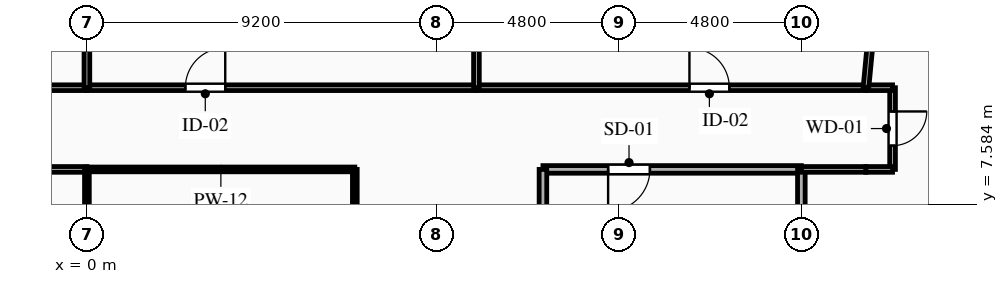
"""IFC4 building model, lengths in metres.
Left out: names, types, materials, properties, quantities, classifications, styles, units other than length and angle.
Written with IfcOpenShell. Run it as: python <this file> out.ifc"""

import sys

from ifc_helpers import new_model, si_unit, direction, frame, frame_2d, origin, place, context, subcontext, project, spatial, rectangle, extrude, element, fill, save


model = new_model("IFC4")
c1 = context("Model", 3, precision=1e-05, world=origin(), true_north=direction((0.0, 1.0)))
c2 = subcontext(c1, "Body", "Model", "MODEL_VIEW")
j1 = project(units=[si_unit("LENGTHUNIT", "METRE"), si_unit("PLANEANGLEUNIT", "RADIAN")], contexts=[c1])
p1 = place(None, origin())
s1 = spatial("IfcSite", under=j1, at=p1, CompositionType="ELEMENT")
p2 = place(p1, origin())
s2 = spatial("IfcBuilding", under=s1, at=p2, CompositionType="ELEMENT")
p3 = place(p2, frame((0.0, 0.0, 235.0)))
s3 = spatial("IfcBuildingStorey", under=s2, at=p3, CompositionType="ELEMENT", Elevation=235.0)
p4 = place(p3, frame((18.8, 8.5, 0.0), z_axis=(0.0, 0.0, 1.0), x_axis=(-1.0, 0.0, 0.0)))
e1 = element("IfcWall", 1, at=p4, inside=s3, PredefinedType="PARTITIONING", context=c2, shape_type="SweptSolid", body=[
    extrude(rectangle(XDim=6.8, YDim=0.2, at=frame_2d((3.4, 0.0))), origin(), (0.0, 0.0, 1.0), 3.04),
])
p5 = place(p4, frame((3.985, 0.0, 0.0)))
e2 = element("IfcOpeningElement", 2, at=p5, cuts=e1, PredefinedType="OPENING", context=c2, shape_type="SweptSolid", body=[
    extrude(rectangle(XDim=1.1, YDim=2.15, at=frame_2d((0.55, 1.075))), frame((0.0, 0.11, 0.0), z_axis=(0.0, -1.0, 0.0), x_axis=(1.0, 0.0, 0.0)), (0.0, 0.0, 1.0), 0.22),
])
p6 = place(p3, frame((12.0, 8.5, 0.0), z_axis=(0.0, 0.0, 1.0), x_axis=(0.0, -1.0, 0.0)))
e3 = element("IfcWall", 3, at=p6, inside=s3, PredefinedType="PARTITIONING", context=c2, shape_type="SweptSolid", body=[
    extrude(rectangle(XDim=2.9, YDim=0.2, at=frame_2d((1.45, 0.0))), origin(), (0.0, 0.0, 1.0), 3.04),
])
p7 = place(p3, frame((18.8, 5.6, 0.0), z_axis=(0.0, 0.0, 1.0), x_axis=(0.0, 1.0, 0.0)))
e4 = element("IfcWall", 4, at=p7, inside=s3, PredefinedType="PARTITIONING", context=c2, shape_type="SweptSolid", body=[
    extrude(rectangle(XDim=2.9, YDim=0.2, at=frame_2d((1.45, 0.0))), origin(), (0.0, 0.0, 1.0), 2.665),
])
p8 = place(p3, frame((-7.9, 10.65, 0.0), z_axis=(0.0, 0.0, 1.0), x_axis=(1.0, 0.0, 0.0)))
e5 = element("IfcWall", 5, at=p8, inside=s3, PredefinedType="PARTITIONING", context=c2, shape_type="SweptSolid", body=[
    extrude(rectangle(XDim=7.9, YDim=0.15, at=frame_2d((3.95, 0.0))), origin(), (0.0, 0.0, 1.0), 3.04),
])
p9 = place(p8, frame((3.475, 0.0, 0.0)))
e6 = element("IfcOpeningElement", 6, at=p9, cuts=e5, PredefinedType="OPENING", context=c2, shape_type="SweptSolid", body=[
    extrude(rectangle(XDim=0.95, YDim=2.1, at=frame_2d((0.475, 1.05))), frame((0.0, 0.085, 0.0), z_axis=(0.0, -1.0, 0.0), x_axis=(1.0, 0.0, 0.0)), (0.0, 0.0, 1.0), 0.17),
])
p10 = place(p3, frame((0.0, 8.5, 0.0), z_axis=(0.0, 0.0, 1.0), x_axis=(-1.0, 0.0, 0.0)))
e7 = element("IfcWall", 7, at=p10, inside=s3, PredefinedType="PARTITIONING", context=c2, shape_type="SweptSolid", body=[
    extrude(rectangle(XDim=7.05, YDim=0.15, at=frame_2d((3.525, 0.0))), origin(), (0.0, 0.0, 1.0), 3.04),
])
p11 = place(p3, frame((21.2, 10.65, 0.0), z_axis=(0.0, 0.0, 1.0), x_axis=(0.0, -1.0, 0.0)))
e8 = element("IfcWall", 8, at=p11, inside=s3, PredefinedType="PARTITIONING", context=c2, shape_type="SweptSolid", body=[
    extrude(rectangle(XDim=2.15, YDim=0.15, at=frame_2d((1.075, 0.0))), origin(), (0.0, 0.0, 1.0), 3.04),
])
p12 = place(p11, frame((0.625, 0.0, 0.0)))
e9 = element("IfcOpeningElement", 9, at=p12, cuts=e8, PredefinedType="OPENING", context=c2, shape_type="SweptSolid", body=[
    extrude(rectangle(XDim=0.9, YDim=2.1, at=frame_2d((0.45, 1.05))), frame((0.0, 0.085, 0.0), z_axis=(0.0, -1.0, 0.0), x_axis=(1.0, 0.0, 0.0)), (0.0, 0.0, 1.0), 0.17),
])
p13 = place(p3, frame((20.5, 8.5, 0.0), z_axis=(0.0, 0.0, 1.0), x_axis=(-1.0, 0.0, 0.0)))
e10 = element("IfcWall", 10, at=p13, inside=s3, PredefinedType="PARTITIONING", context=c2, shape_type="SweptSolid", body=[
    extrude(rectangle(XDim=1.7, YDim=0.15, at=frame_2d((0.85, 0.0))), origin(), (0.0, 0.0, 1.0), 3.04),
])
for number, where, z_axis, x_axis in (
    (11, (20.5, 10.65, 0.0), (0.0, 0.0, 1.0), (1.0, 0.0, 0.0)),
    (12, (21.2, 8.5, 0.0), (0.0, 0.0, 1.0), (-1.0, 0.0, 0.0)),
):
    element("IfcWall", number, at=place(p3, frame(where, z_axis=z_axis, x_axis=x_axis)), inside=s3, PredefinedType="PARTITIONING", context=c2, shape_type="SweptSolid", body=[
        extrude(rectangle(XDim=0.7, YDim=0.15, at=frame_2d((0.35, 0.0))), origin(), (0.0, 0.0, 1.0), 3.04),
    ])
p14 = place(p3, frame((0.0, 10.65, 0.0), z_axis=(0.0, 0.0, 1.0), x_axis=(1.0, 0.0, 0.0)))
e13 = element("IfcWall", 13, at=p14, inside=s3, PredefinedType="PARTITIONING", context=c2, shape_type="SweptSolid", body=[
    extrude(rectangle(XDim=10.25, YDim=0.15, at=frame_2d((5.125, 0.0))), origin(), (0.0, 0.0, 1.0), 3.04),
])
p15 = place(p14, frame((2.59, 0.0, 0.0)))
e14 = element("IfcOpeningElement", 14, at=p15, cuts=e13, PredefinedType="OPENING", context=c2, shape_type="SweptSolid", body=[
    extrude(rectangle(XDim=1.05, YDim=2.15, at=frame_2d((0.525, 1.075))), frame((0.0, 0.085, 0.0), z_axis=(0.0, -1.0, 0.0), x_axis=(1.0, 0.0, 0.0)), (0.0, 0.0, 1.0), 0.17),
])
p16 = place(p3, frame((10.25, 10.65, 0.0), z_axis=(0.0, 0.0, 1.0), x_axis=(1.0, 0.0, 0.0)))
e15 = element("IfcWall", 15, at=p16, inside=s3, PredefinedType="PARTITIONING", context=c2, shape_type="SweptSolid", body=[
    extrude(rectangle(XDim=10.25, YDim=0.15, at=frame_2d((5.125, 0.0))), origin(), (0.0, 0.0, 1.0), 3.04),
])
p17 = place(p16, frame((5.605, 0.0, 0.0)))
e16 = element("IfcOpeningElement", 16, at=p17, cuts=e15, PredefinedType="OPENING", context=c2, shape_type="SweptSolid", body=[
    extrude(rectangle(XDim=1.05, YDim=2.15, at=frame_2d((0.525, 1.075))), frame((0.0, 0.085, 0.0), z_axis=(0.0, -1.0, 0.0), x_axis=(1.0, 0.0, 0.0)), (0.0, 0.0, 1.0), 0.17),
])
p18 = place(p3, frame((7.05, 8.5, 0.0), z_axis=(0.0, 0.0, 1.0), x_axis=(-1.0, 0.0, 0.0)))
e17 = element("IfcWall", 17, at=p18, inside=s3, PredefinedType="PARTITIONING", context=c2, shape_type="SweptSolid", body=[
    extrude(rectangle(XDim=7.05, YDim=0.125, at=frame_2d((3.525, 0.0))), origin(), (0.0, 0.0, 1.0), 3.04),
])
p19 = place(p3, frame((7.05, -5.6, 0.0), z_axis=(0.0, 0.0, 1.0), x_axis=(0.0, 1.0, 0.0)))
e18 = element("IfcWall", 18, at=p19, inside=s3, PredefinedType="PARTITIONING", context=c2, shape_type="SweptSolid", body=[
    extrude(rectangle(XDim=14.1, YDim=0.125, at=frame_2d((7.05, 0.0))), origin(), (0.0, 0.0, 1.0), 3.04),
])
p20 = place(p19, frame((5.076, 0.0, 0.0)))
e19 = element("IfcOpeningElement", 19, at=p20, cuts=e18, PredefinedType="OPENING", context=c2, shape_type="SweptSolid", body=[
    extrude(rectangle(XDim=0.95, YDim=2.1, at=frame_2d((0.475, 1.05))), frame((0.0, 0.073, 0.0), z_axis=(0.0, -1.0, 0.0), x_axis=(1.0, 0.0, 0.0)), (0.0, 0.0, 1.0), 0.145),
])
p21 = place(p3, frame((20.5, 10.65, 0.0), z_axis=(0.0, 0.0, 1.0), x_axis=(0.094820015289, 0.99549443228, 0.0)))
e20 = element("IfcWall", 20, at=p21, inside=s3, PredefinedType="PARTITIONING", context=c2, shape_type="SweptSolid", body=[
    extrude(rectangle(XDim=3.164, YDim=0.15, at=frame_2d((1.582, 0.0))), origin(), (0.0, 0.0, 1.0), 3.04),
])
for number, where, z_axis, x_axis in (
    (21, (0.0, 15.2, 0.0), (0.0, 0.0, 1.0), (0.0, -1.0, 0.0)),
    (22, (10.25, 15.2, 0.0), (0.0, 0.0, 1.0), (0.0, -1.0, 0.0)),
):
    element("IfcWall", number, at=place(p3, frame(where, z_axis=z_axis, x_axis=x_axis)), inside=s3, PredefinedType="PARTITIONING", context=c2, shape_type="SweptSolid", body=[
        extrude(rectangle(XDim=4.55, YDim=0.15, at=frame_2d((2.275, 0.0))), origin(), (0.0, 0.0, 1.0), 3.04),
    ])
p22 = place(p3, frame((0.0, 8.5, 0.0), z_axis=(0.0, 0.0, 1.0), x_axis=(0.0, -1.0, 0.0)))
e23 = element("IfcWall", 23, at=p22, inside=s3, PredefinedType="PARTITIONING", context=c2, shape_type="SweptSolid", body=[
    extrude(rectangle(XDim=14.1, YDim=0.125, at=frame_2d((7.05, 0.0))), origin(), (0.0, 0.0, 1.0), 3.04),
])
p23 = place(p5, origin())
e24 = element("IfcDoor", 24, at=p23, inside=s3, OperationType="SINGLE_SWING_RIGHT", PredefinedType="DOOR", context=c2, shape_type="SweptSolid", body=[
    extrude(rectangle(XDim=1.1, YDim=2.15, at=frame_2d((0.55, 1.075))), frame((0.0, 0.025, 0.0), z_axis=(0.0, -1.0, 0.0), x_axis=(1.0, 0.0, 0.0)), (0.0, 0.0, 1.0), 0.05),
])
fill(e2, e24)
p24 = place(p12, origin())
e25 = element("IfcDoor", 25, at=p24, inside=s3, OperationType="SINGLE_SWING_LEFT", PredefinedType="DOOR", context=c2, shape_type="SweptSolid", body=[
    extrude(rectangle(XDim=0.9, YDim=2.1, at=frame_2d((0.45, 1.05))), frame((0.0, 0.025, 0.0), z_axis=(0.0, -1.0, 0.0), x_axis=(1.0, 0.0, 0.0)), (0.0, 0.0, 1.0), 0.05),
])
fill(e9, e25)
p25 = place(p15, origin())
e26 = element("IfcDoor", 26, at=p25, inside=s3, OperationType="SINGLE_SWING_RIGHT", PredefinedType="DOOR", context=c2, shape_type="SweptSolid", body=[
    extrude(rectangle(XDim=1.05, YDim=2.15, at=frame_2d((0.525, 1.075))), frame((0.0, 0.025, 0.0), z_axis=(0.0, -1.0, 0.0), x_axis=(1.0, 0.0, 0.0)), (0.0, 0.0, 1.0), 0.05),
])
fill(e14, e26)
p26 = place(p17, origin())
e27 = element("IfcDoor", 27, at=p26, inside=s3, OperationType="SINGLE_SWING_LEFT", PredefinedType="DOOR", context=c2, shape_type="SweptSolid", body=[
    extrude(rectangle(XDim=1.05, YDim=2.15, at=frame_2d((0.525, 1.075))), frame((0.0, 0.025, 0.0), z_axis=(0.0, -1.0, 0.0), x_axis=(1.0, 0.0, 0.0)), (0.0, 0.0, 1.0), 0.05),
])
fill(e16, e27)
save(model, sys.argv[1])
